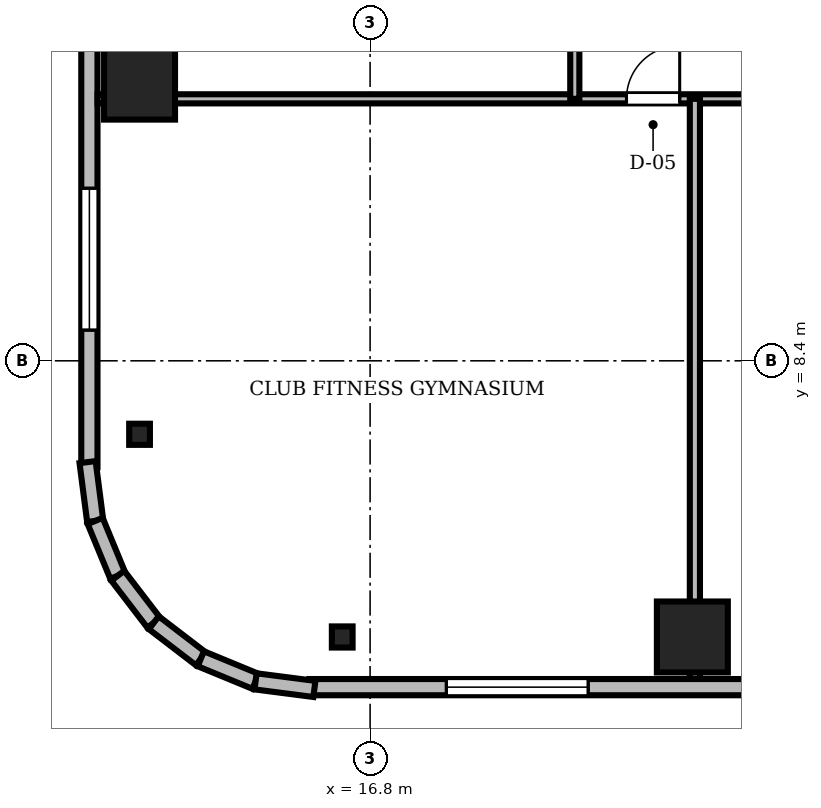
"""IFC4 building model, lengths in metres.
Left out: names, types, materials, properties, quantities, classifications, styles, units other than length and angle.
Written with IfcOpenShell. Run it as: python <this file> out.ifc"""

import sys

from ifc_helpers import new_model, si_unit, direction, frame, frame_2d, origin, origin_2d, place, context, subcontext, project, spatial, rectangle, i_section, extrude, source, transform, mapped, element, fill, save


model = new_model("IFC4")
c1 = context("Model", 3, precision=1e-05, world=origin(), true_north=direction((0.0, 1.0)))
c2 = subcontext(c1, "Body", "Model", "MODEL_VIEW")
j1 = project(units=[si_unit("LENGTHUNIT", "METRE"), si_unit("PLANEANGLEUNIT", "RADIAN")], contexts=[c1])
p1 = place(None, origin())
s1 = spatial("IfcSite", under=j1, at=p1, CompositionType="ELEMENT")
p2 = place(p1, origin())
s2 = spatial("IfcBuilding", under=s1, at=p2, CompositionType="ELEMENT")
p3 = place(p2, frame((0.0, 0.0, 218.55)))
s3 = spatial("IfcBuildingStorey", under=s2, at=p3, CompositionType="ELEMENT", Elevation=218.55)
m1 = source(origin(), c2, "Body", "SweptSolid", [
    extrude(rectangle(XDim=1.4, YDim=1.4, at=origin_2d()), origin(), (0.0, 0.0, 1.0), 3.53),
])
for number, where, z_axis, x_axis in (
    (1, (23.16, 2.95, 0.0), (0.0, 0.0, 1.0), (1.0, 0.0, 0.0)),
    (2, (12.25, 13.86, 0.0), (0.0, 0.0, 1.0), (1.0, 0.0, 0.0)),
):
    element("IfcColumn", number, at=place(p3, frame(where, z_axis=z_axis, x_axis=x_axis)), inside=s3, PredefinedType="COLUMN", context=c2, shape_type="MappedRepresentation", body=[
        mapped(m1, transform((0.0, 0.0, 0.0), scale=1.0)),
    ])
m2 = source(origin(), c2, "Body", "SweptSolid", [
    extrude(i_section(OverallWidth=0.409, OverallDepth=0.417, WebThickness=0.021, FlangeThickness=0.033, FilletRadius=0.015, at=origin_2d()), origin(), (0.0, 0.0, 1.0), 3.53),
])
for number, where, z_axis, x_axis in (
    (3, (16.25, 2.95, 0.0), (0.0, 0.0, 1.0), (1.0, 0.0, 0.0)),
    (4, (12.25, 6.95, 0.0), (0.0, 0.0, 1.0), (1.0, 0.0, 0.0)),
):
    element("IfcColumn", number, at=place(p3, frame(where, z_axis=z_axis, x_axis=x_axis)), inside=s3, PredefinedType="COLUMN", context=c2, shape_type="MappedRepresentation", body=[
        mapped(m2, transform((0.0, 0.0, 0.0), scale=1.0)),
    ])
m3 = source(origin(), c2, "Body", "SweptSolid", [
    extrude(rectangle(XDim=15.6, YDim=0.32, at=frame_2d((7.8, 0.0))), origin(), (0.0, 0.0, 1.0), 3.53),
])
p4 = place(p3, frame((15.6, 1.96, 0.0), z_axis=(0.0, 0.0, 1.0), x_axis=(1.0, 0.0, 0.0)))
e5 = element("IfcWall", 5, at=p4, inside=s3, PredefinedType="SOLIDWALL", context=c2, shape_type="MappedRepresentation", body=[
    mapped(m3, transform((0.0, 0.0, 0.0), scale=1.0)),
])
m4 = source(origin(), c2, "Body", "SweptSolid", [
    extrude(rectangle(XDim=1.4, YDim=2.3, at=frame_2d((0.7, 1.15))), frame((0.0, 0.17, 0.0), z_axis=(0.0, -1.0, 0.0), x_axis=(1.0, 0.0, 0.0)), (0.0, 0.0, 1.0), 0.34),
])
p5 = place(p4, frame((9.61, 0.0, 0.0)))
e6 = element("IfcOpeningElement", 6, at=p5, cuts=e5, PredefinedType="OPENING", context=c2, shape_type="MappedRepresentation", body=[
    mapped(m4, transform((0.0, 0.0, 0.0), scale=1.0)),
])
m5 = source(origin(), c2, "Body", "SweptSolid", [
    extrude(rectangle(XDim=2.8, YDim=2.4, at=frame_2d((1.4, 1.2))), frame((0.0, 0.17, 0.0), z_axis=(0.0, -1.0, 0.0), x_axis=(1.0, 0.0, 0.0)), (0.0, 0.0, 1.0), 0.34),
])
p6 = place(p4, frame((2.705, 0.0, 0.72)))
e7 = element("IfcOpeningElement", 7, at=p6, cuts=e5, PredefinedType="OPENING", context=c2, shape_type="MappedRepresentation", body=[
    mapped(m5, transform((0.0, 0.0, 0.0), scale=1.0)),
])
p7 = place(p3, frame((11.26, 21.9, 0.0), z_axis=(0.0, 0.0, 1.0), x_axis=(0.0, -1.0, 0.0)))
e8 = element("IfcWall", 8, at=p7, inside=s3, PredefinedType="SOLIDWALL", context=c2, shape_type="MappedRepresentation", body=[
    mapped(m3, transform((0.0, 0.0, 0.0), scale=1.0)),
])
p8 = place(p7, frame((10.095, 0.0, 0.72)))
e9 = element("IfcOpeningElement", 9, at=p8, cuts=e8, PredefinedType="OPENING", context=c2, shape_type="MappedRepresentation", body=[
    mapped(m5, transform((0.0, 0.0, 0.0), scale=1.0)),
])
m6 = source(origin(), c2, "Body", "SweptSolid", [
    extrude(rectangle(XDim=1.171, YDim=0.32, at=frame_2d((0.585, 0.0))), origin(), (0.0, 0.0, 1.0), 3.53),
])
p9 = place(p3, frame((11.224, 6.401, 0.0), z_axis=(0.0, 0.0, 1.0), x_axis=(0.128269133229, -0.991739395941, 0.0)))
e10 = element("IfcWall", 10, at=p9, inside=s3, PredefinedType="SOLIDWALL", context=c2, shape_type="MappedRepresentation", body=[
    mapped(m6, transform((0.0, 0.0, 0.0), scale=1.0)),
])
m7 = source(origin(), c2, "Body", "SweptSolid", [
    extrude(rectangle(XDim=1.169, YDim=0.32, at=frame_2d((0.584, 0.0))), origin(), (0.0, 0.0, 1.0), 3.53),
])
for number, where, z_axis, x_axis in (
    (11, (11.375, 5.24, 0.0), (0.0, 0.0, 1.0), (0.381, -0.925, 0.0)),
    (12, (11.82, 4.159, 0.0), (0.0, 0.0, 1.0), (0.608, -0.794, 0.0)),
):
    element("IfcWall", number, at=place(p3, frame(where, z_axis=z_axis, x_axis=x_axis)), inside=s3, PredefinedType="SOLIDWALL", context=c2, shape_type="MappedRepresentation", body=[
        mapped(m7, transform((0.0, 0.0, 0.0), scale=1.0)),
    ])
m8 = source(origin(), c2, "Body", "SweptSolid", [
    extrude(rectangle(XDim=1.169, YDim=0.32, at=frame_2d((0.584, 0.0))), origin(), (0.0, 0.0, 1.0), 3.53),
])
p10 = place(p3, frame((12.531, 3.231, 0.0), z_axis=(0.0, 0.0, 1.0), x_axis=(0.793663520347, -0.608356981114, 0.0)))
e13 = element("IfcWall", 13, at=p10, inside=s3, PredefinedType="SOLIDWALL", context=c2, shape_type="MappedRepresentation", body=[
    mapped(m8, transform((0.0, 0.0, 0.0), scale=1.0)),
])
m9 = source(origin(), c2, "Body", "SweptSolid", [
    extrude(rectangle(XDim=1.169, YDim=0.32, at=frame_2d((0.585, 0.0))), origin(), (0.0, 0.0, 1.0), 3.53),
])
p11 = place(p3, frame((13.459, 2.52, 0.0), z_axis=(0.0, 0.0, 1.0), x_axis=(0.924479075121, -0.381232789334, 0.0)))
e14 = element("IfcWall", 14, at=p11, inside=s3, PredefinedType="SOLIDWALL", context=c2, shape_type="MappedRepresentation", body=[
    mapped(m9, transform((0.0, 0.0, 0.0), scale=1.0)),
])
m10 = source(origin(), c2, "Body", "SweptSolid", [
    extrude(rectangle(XDim=1.17, YDim=0.32, at=frame_2d((0.585, 0.0))), origin(), (0.0, 0.0, 1.0), 3.53),
])
p12 = place(p3, frame((14.54, 2.074, 0.0), z_axis=(0.0, 0.0, 1.0), x_axis=(0.991762485493, -0.128090485085, 0.0)))
e15 = element("IfcWall", 15, at=p12, inside=s3, PredefinedType="SOLIDWALL", context=c2, shape_type="MappedRepresentation", body=[
    mapped(m10, transform((0.0, 0.0, 0.0), scale=1.0)),
])
m11 = source(origin(), c2, "Body", "SweptSolid", [
    extrude(rectangle(XDim=46.156, YDim=0.18, at=frame_2d((23.078, 0.0))), origin(), (0.0, 0.0, 1.0), 2.772),
])
p13 = place(p3, frame((11.422, 13.57, 0.0), z_axis=(0.0, 0.0, 1.0), x_axis=(1.0, 0.0, 0.0)))
e16 = element("IfcWall", 16, at=p13, inside=s3, PredefinedType="PARTITIONING", context=c2, shape_type="MappedRepresentation", body=[
    mapped(m11, transform((0.0, 0.0, 0.0), scale=1.0)),
])
m12 = source(origin(), c2, "Body", "SweptSolid", [
    extrude(rectangle(XDim=1.05, YDim=2.2, at=frame_2d((0.525, 1.1))), frame((0.0, 0.1, 0.0), z_axis=(0.0, -1.0, 0.0), x_axis=(1.0, 0.0, 0.0)), (0.0, 0.0, 1.0), 0.2),
])
p14 = place(p13, frame((10.438, 0.0, 0.0)))
e17 = element("IfcOpeningElement", 17, at=p14, cuts=e16, PredefinedType="OPENING", context=c2, shape_type="MappedRepresentation", body=[
    mapped(m12, transform((0.0, 0.0, 0.0), scale=1.0)),
])
p15 = place(p13, frame((13.218, 0.0, 0.0)))
e18 = element("IfcOpeningElement", 18, at=p15, cuts=e16, PredefinedType="OPENING", context=c2, shape_type="MappedRepresentation", body=[
    mapped(m12, transform((0.0, 0.0, 0.0), scale=1.0)),
])
p16 = place(p13, frame((16.893, 0.0, 0.0)))
e19 = element("IfcOpeningElement", 19, at=p16, cuts=e16, PredefinedType="OPENING", context=c2, shape_type="MappedRepresentation", body=[
    mapped(m12, transform((0.0, 0.0, 0.0), scale=1.0)),
])
p17 = place(p13, frame((20.346, 0.0, 0.0)))
e20 = element("IfcOpeningElement", 20, at=p17, cuts=e16, PredefinedType="OPENING", context=c2, shape_type="MappedRepresentation", body=[
    mapped(m12, transform((0.0, 0.0, 0.0), scale=1.0)),
])
p18 = place(p13, frame((24.124, 0.0, 0.0)))
e21 = element("IfcOpeningElement", 21, at=p18, cuts=e16, PredefinedType="OPENING", context=c2, shape_type="MappedRepresentation", body=[
    mapped(m12, transform((0.0, 0.0, 0.0), scale=1.0)),
])
p19 = place(p13, frame((28.226, 0.0, 0.0)))
e22 = element("IfcOpeningElement", 22, at=p19, cuts=e16, PredefinedType="OPENING", context=c2, shape_type="MappedRepresentation", body=[
    mapped(m12, transform((0.0, 0.0, 0.0), scale=1.0)),
])
p20 = place(p13, frame((33.077, 0.0, 0.0)))
e23 = element("IfcOpeningElement", 23, at=p20, cuts=e16, PredefinedType="OPENING", context=c2, shape_type="MappedRepresentation", body=[
    mapped(m12, transform((0.0, 0.0, 0.0), scale=1.0)),
])
p21 = place(p13, frame((37.498, 0.0, 0.0)))
e24 = element("IfcOpeningElement", 24, at=p21, cuts=e16, PredefinedType="OPENING", context=c2, shape_type="MappedRepresentation", body=[
    mapped(m12, transform((0.0, 0.0, 0.0), scale=1.0)),
])
m13 = source(origin(), c2, "Body", "SweptSolid", [
    extrude(rectangle(XDim=14.98, YDim=0.18, at=frame_2d((7.49, 0.0))), origin(), (0.0, 0.0, 1.0), 2.972),
])
p22 = place(p3, frame((20.84, 13.57, 0.0), z_axis=(0.0, 0.0, 1.0), x_axis=(0.0, 1.0, 0.0)))
e25 = element("IfcWall", 25, at=p22, inside=s3, PredefinedType="PARTITIONING", context=c2, shape_type="MappedRepresentation", body=[
    mapped(m13, transform((0.0, 0.0, 0.0), scale=1.0)),
])
p23 = place(p22, frame((1.952, 0.0, 0.0)))
e26 = element("IfcOpeningElement", 26, at=p23, cuts=e25, PredefinedType="OPENING", context=c2, shape_type="MappedRepresentation", body=[
    mapped(m12, transform((0.0, 0.0, 0.0), scale=1.0)),
])
m14 = source(origin(), c2, "Body", "SweptSolid", [
    extrude(rectangle(XDim=0.95, YDim=2.15, at=frame_2d((0.475, 1.075))), frame((0.0, 0.1, 0.0), z_axis=(0.0, -1.0, 0.0), x_axis=(1.0, 0.0, 0.0)), (0.0, 0.0, 1.0), 0.2),
])
p24 = place(p22, frame((8.12, 0.0, 0.0)))
e27 = element("IfcOpeningElement", 27, at=p24, cuts=e25, PredefinedType="OPENING", context=c2, shape_type="MappedRepresentation", body=[
    mapped(m14, transform((0.0, 0.0, 0.0), scale=1.0)),
])
p25 = place(p22, frame((11.838, 0.0, 0.0)))
e28 = element("IfcOpeningElement", 28, at=p25, cuts=e25, PredefinedType="OPENING", context=c2, shape_type="MappedRepresentation", body=[
    mapped(m12, transform((0.0, 0.0, 0.0), scale=1.0)),
])
m15 = source(origin(), c2, "Body", "SweptSolid", [
    extrude(rectangle(XDim=11.448, YDim=0.2, at=frame_2d((5.724, 0.0))), origin(), (0.0, 0.0, 1.0), 2.772),
])
p26 = place(p3, frame((23.21, 2.122, 0.0), z_axis=(0.0, 0.0, 1.0), x_axis=(0.0, 1.0, 0.0)))
e29 = element("IfcWall", 29, at=p26, inside=s3, PredefinedType="PARTITIONING", context=c2, shape_type="MappedRepresentation", body=[
    mapped(m15, transform((0.0, 0.0, 0.0), scale=1.0)),
])
m16 = source(origin(), c2, "Body", "SweptSolid", [
    extrude(rectangle(XDim=2.8, YDim=2.4, at=frame_2d((1.4, 1.2))), frame((0.0, 0.03, 0.0), z_axis=(0.0, -1.0, 0.0), x_axis=(1.0, 0.0, 0.0)), (0.0, 0.0, 1.0), 0.06),
])
p27 = place(p6, origin())
e30 = element("IfcWindow", 30, at=p27, inside=s3, PartitioningType="SINGLE_PANEL", PredefinedType="WINDOW", context=c2, shape_type="MappedRepresentation", body=[
    mapped(m16, transform((0.0, 0.0, 0.0), scale=1.0)),
])
fill(e7, e30)
p28 = place(p8, origin())
e31 = element("IfcWindow", 31, at=p28, inside=s3, PartitioningType="SINGLE_PANEL", PredefinedType="WINDOW", context=c2, shape_type="MappedRepresentation", body=[
    mapped(m16, transform((0.0, 0.0, 0.0), scale=1.0)),
])
fill(e9, e31)
m17 = source(origin(), c2, "Body", "SweptSolid", [
    extrude(rectangle(XDim=1.05, YDim=2.2, at=frame_2d((0.525, 1.1))), frame((0.0, 0.025, 0.0), z_axis=(0.0, -1.0, 0.0), x_axis=(1.0, 0.0, 0.0)), (0.0, 0.0, 1.0), 0.05),
])
p29 = place(p14, origin())
e32 = element("IfcDoor", 32, at=p29, inside=s3, OperationType="SINGLE_SWING_RIGHT", PredefinedType="DOOR", context=c2, shape_type="MappedRepresentation", body=[
    mapped(m17, transform((0.0, 0.0, 0.0), scale=1.0)),
])
fill(e17, e32)
save(model, sys.argv[1])
